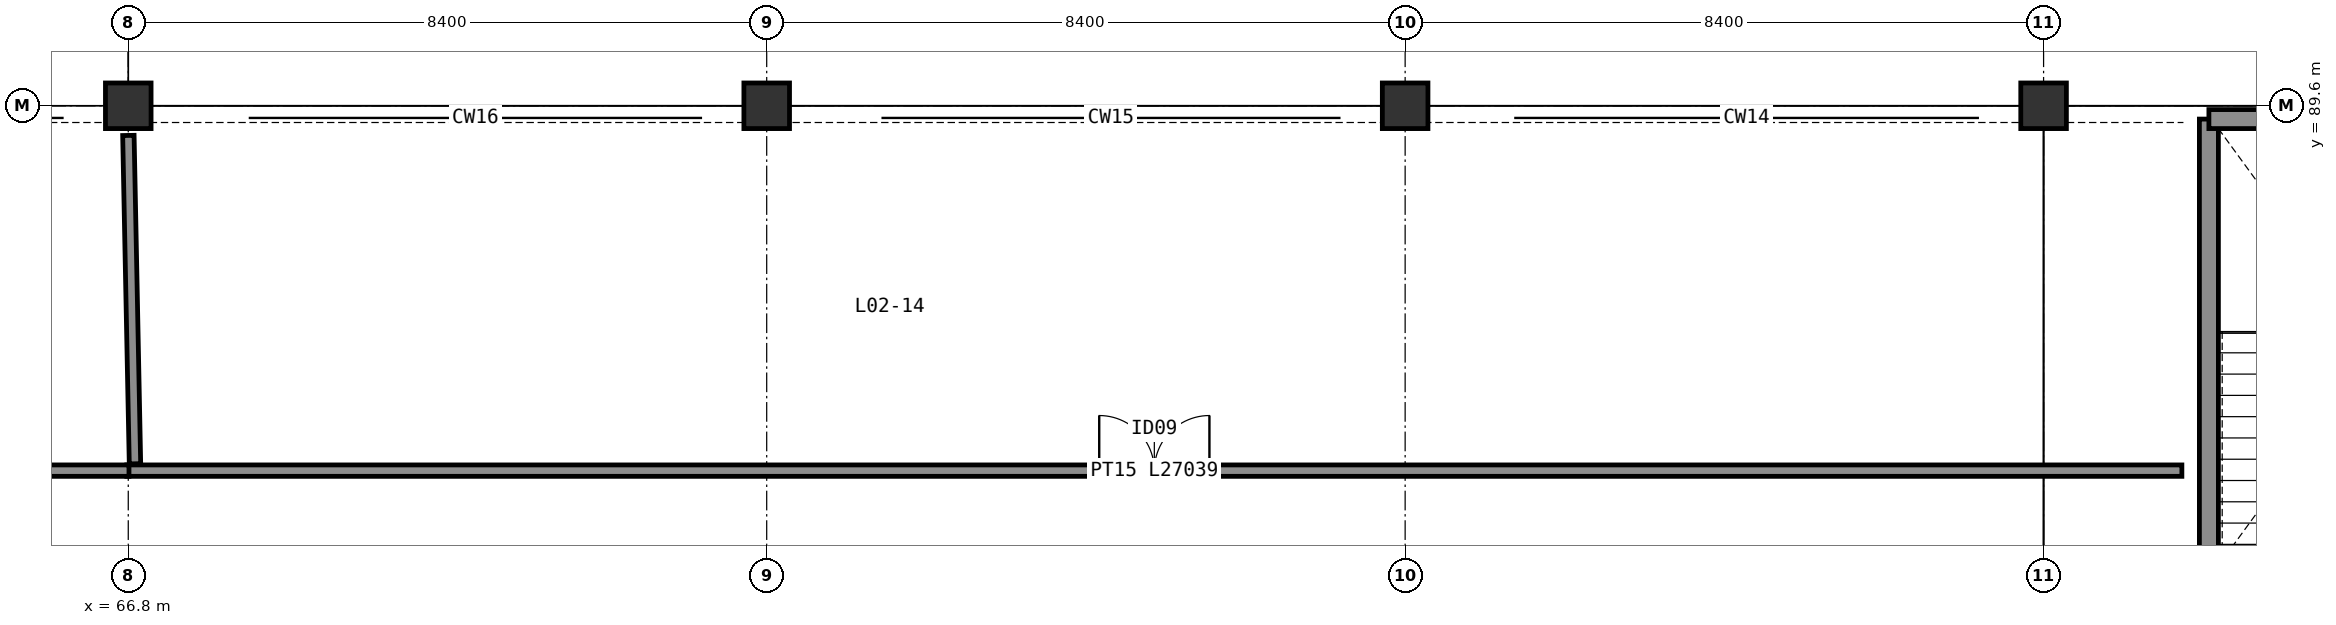
"""IFC4 building model, lengths in metres.
Left out: names, types, materials, properties, quantities, classifications, styles, units other than length and angle.
Written with IfcOpenShell. Run it as: python <this file> out.ifc"""

import sys

from ifc_helpers import new_model, si_unit, direction, frame, frame_2d, origin, origin_2d, place, context, subcontext, project, spatial, rectangle, extrude, element, fill, save


model = new_model("IFC4")
c1 = context("Model", 3, precision=1e-05, world=origin(), true_north=direction((0.0, 1.0)))
c2 = subcontext(c1, "Body", "Model", "MODEL_VIEW")
j1 = project(units=[si_unit("LENGTHUNIT", "METRE"), si_unit("PLANEANGLEUNIT", "RADIAN")], contexts=[c1])
p1 = place(None, origin())
s1 = spatial("IfcSite", under=j1, at=p1, CompositionType="ELEMENT")
p2 = place(p1, origin())
s2 = spatial("IfcBuilding", under=s1, at=p2, CompositionType="ELEMENT")
p3 = place(p2, frame((0.0, 0.0, 9.6)))
s3 = spatial("IfcBuildingStorey", under=s2, at=p3, CompositionType="ELEMENT", Elevation=9.6)
for number, where, z_axis, x_axis in (
    (1, (66.8, 89.6, 0.0), (0.0, 0.0, 1.0), (1.0, 0.0, 0.0)),
    (2, (75.2, 89.6, 0.0), (0.0, 0.0, 1.0), (1.0, 0.0, 0.0)),
    (3, (83.6, 89.6, 0.0), (0.0, 0.0, 1.0), (1.0, 0.0, 0.0)),
    (4, (92.0, 89.6, 0.0), (0.0, 0.0, 1.0), (1.0, 0.0, 0.0)),
):
    element("IfcColumn", number, at=place(p3, frame(where, z_axis=z_axis, x_axis=x_axis)), inside=s3, PredefinedType="COLUMN", context=c2, shape_type="SweptSolid", body=[
        extrude(rectangle(XDim=0.6, YDim=0.6, at=origin_2d()), origin(), (0.0, 0.0, 1.0), 4.2),
    ])
p4 = place(p3, frame((94.175, 81.325, 0.0), z_axis=(0.0, 0.0, 1.0), x_axis=(0.0, 1.0, 0.0)))
e5 = element("IfcWall", 5, at=p4, inside=s3, PredefinedType="SHEAR", context=c2, shape_type="SweptSolid", body=[
    extrude(rectangle(XDim=8.1, YDim=0.25, at=frame_2d((4.05, 0.0))), origin(), (0.0, 0.0, 1.0), 3.95),
])
p5 = place(p3, frame((94.175, 89.425, 0.0), z_axis=(0.0, 0.0, 1.0), x_axis=(1.0, 0.0, 0.0)))
e6 = element("IfcWall", 6, at=p5, inside=s3, PredefinedType="SHEAR", context=c2, shape_type="SweptSolid", body=[
    extrude(rectangle(XDim=4.45, YDim=0.25, at=frame_2d((2.225, 0.0))), origin(), (0.0, 0.0, 1.0), 3.95),
])
p6 = place(p3, frame((66.781, 84.8, 0.0), z_axis=(0.0, 0.0, 1.0), x_axis=(1.0, 0.0, 0.0)))
e7 = element("IfcWall", 7, at=p6, inside=s3, PredefinedType="PARTITIONING", context=c2, shape_type="SweptSolid", body=[
    extrude(rectangle(XDim=27.039, YDim=0.15, at=frame_2d((13.52, 0.0))), origin(), (0.0, 0.0, 1.0), 3.93),
])
p7 = place(p6, frame((12.794, 0.0, 0.0)))
e8 = element("IfcOpeningElement", 8, at=p7, cuts=e7, PredefinedType="OPENING", context=c2, shape_type="SweptSolid", body=[
    extrude(rectangle(XDim=1.45, YDim=2.18, at=frame_2d((0.725, 1.09))), frame((0.0, 0.085, 0.0), z_axis=(0.0, -1.0, 0.0), x_axis=(1.0, 0.0, 0.0)), (0.0, 0.0, 1.0), 0.17),
])
p8 = place(p3, frame((27.98, 84.8, 0.0), z_axis=(0.0, 0.0, 1.0), x_axis=(1.0, 0.0, 0.0)))
e9 = element("IfcWall", 9, at=p8, inside=s3, PredefinedType="PARTITIONING", context=c2, shape_type="SweptSolid", body=[
    extrude(rectangle(XDim=38.829, YDim=0.15, at=frame_2d((19.415, 0.0))), origin(), (0.0, 0.0, 1.0), 3.93),
])
p9 = place(p8, frame((18.59, 0.0, 0.0)))
e10 = element("IfcOpeningElement", 10, at=p9, cuts=e9, PredefinedType="OPENING", context=c2, shape_type="SweptSolid", body=[
    extrude(rectangle(XDim=1.65, YDim=2.18, at=frame_2d((0.825, 1.09))), frame((0.0, 0.085, 0.0), z_axis=(0.0, -1.0, 0.0), x_axis=(1.0, 0.0, 0.0)), (0.0, 0.0, 1.0), 0.17),
])
p10 = place(p3, frame((66.888, 84.89, 0.0), z_axis=(0.0, 0.0, 1.0), x_axis=(-0.020114607198, 0.999797680822, 0.0)))
e11 = element("IfcWall", 11, at=p10, inside=s3, PredefinedType="PARTITIONING", context=c2, shape_type="SweptSolid", body=[
    extrude(rectangle(XDim=4.321, YDim=0.15, at=frame_2d((2.161, 0.0))), origin(), (0.0, 0.0, 1.0), 3.305),
])
p11 = place(p7, origin())
e12 = element("IfcDoor", 12, at=p11, inside=s3, OperationType="DOUBLE_DOOR_SINGLE_SWING", PredefinedType="DOOR", context=c2, shape_type="SweptSolid", body=[
    extrude(rectangle(XDim=1.45, YDim=2.18, at=frame_2d((0.725, 1.09))), frame((0.0, 0.025, 0.0), z_axis=(0.0, -1.0, 0.0), x_axis=(1.0, 0.0, 0.0)), (0.0, 0.0, 1.0), 0.05),
])
fill(e8, e12)
save(model, sys.argv[1])
